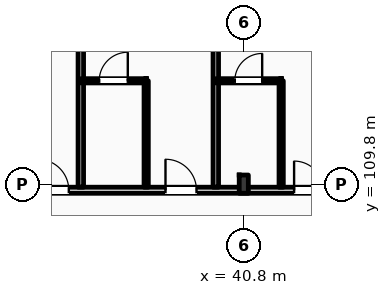
"""IFC4 building model, lengths in metres.
Left out: names, types, materials, properties, quantities, classifications, styles, units other than length and angle.
Written with IfcOpenShell. Run it as: python <this file> out.ifc"""

import sys

from ifc_helpers import new_model, si_unit, direction, frame, frame_2d, origin, origin_2d, place, context, subcontext, project, spatial, rectangle, i_section, extrude, element, fill, save


model = new_model("IFC4")
c1 = context("Model", 3, precision=1e-05, world=origin(), true_north=direction((0.0, 1.0)))
c2 = subcontext(c1, "Body", "Model", "MODEL_VIEW")
j1 = project(units=[si_unit("LENGTHUNIT", "METRE"), si_unit("PLANEANGLEUNIT", "RADIAN")], contexts=[c1])
p1 = place(None, origin())
s1 = spatial("IfcSite", under=j1, at=p1, CompositionType="ELEMENT")
p2 = place(p1, origin())
s2 = spatial("IfcBuilding", under=s1, at=p2, CompositionType="ELEMENT")
p3 = place(p2, frame((0.0, 0.0, 20.4)))
s3 = spatial("IfcBuildingStorey", under=s2, at=p3, CompositionType="ELEMENT", Elevation=20.4)
p4 = place(p3, frame((40.8, 109.8, 0.0), z_axis=(0.0, 0.0, 1.0), x_axis=(1.0, 0.0, 0.0)))
e1 = element("IfcColumn", 1, at=p4, inside=s3, PredefinedType="COLUMN", context=c2, shape_type="SweptSolid", body=[
    extrude(i_section(OverallWidth=0.3, OverallDepth=0.6, WebThickness=0.015, FlangeThickness=0.03, FilletRadius=0.027, at=origin_2d()), origin(), (0.0, 0.0, 1.0), 4.2),
])
p5 = place(p3, frame((10.65, 109.6, 0.0), z_axis=(0.0, 0.0, 1.0), x_axis=(1.0, 0.0, 0.0)))
e2 = element("IfcWall", 2, at=p5, inside=s3, PredefinedType="PARTITIONING", context=c2, shape_type="SweptSolid", body=[
    extrude(rectangle(XDim=109.21, YDim=0.2, at=frame_2d((54.605, 0.0))), origin(), (0.0, 0.0, 1.0), 3.38),
])
p6 = place(p5, frame((12.535, 0.0, 0.0)))
e3 = element("IfcOpeningElement", 3, at=p6, cuts=e2, PredefinedType="OPENING", context=c2, shape_type="SweptSolid", body=[
    extrude(rectangle(XDim=1.02, YDim=2.2, at=frame_2d((0.51, 1.1))), frame((0.0, 0.11, 0.0), z_axis=(0.0, -1.0, 0.0), x_axis=(1.0, 0.0, 0.0)), (0.0, 0.0, 1.0), 0.22),
])
p7 = place(p5, frame((19.175, 0.0, 0.0)))
e4 = element("IfcOpeningElement", 4, at=p7, cuts=e2, PredefinedType="OPENING", context=c2, shape_type="SweptSolid", body=[
    extrude(rectangle(XDim=1.02, YDim=2.2, at=frame_2d((0.51, 1.1))), frame((0.0, 0.11, 0.0), z_axis=(0.0, -1.0, 0.0), x_axis=(1.0, 0.0, 0.0)), (0.0, 0.0, 1.0), 0.22),
])
p8 = place(p5, frame((23.375, 0.0, 0.0)))
e5 = element("IfcOpeningElement", 5, at=p8, cuts=e2, PredefinedType="OPENING", context=c2, shape_type="SweptSolid", body=[
    extrude(rectangle(XDim=1.02, YDim=2.2, at=frame_2d((0.51, 1.1))), frame((0.0, 0.11, 0.0), z_axis=(0.0, -1.0, 0.0), x_axis=(1.0, 0.0, 0.0)), (0.0, 0.0, 1.0), 0.22),
])
p9 = place(p5, frame((27.575, 0.0, 0.0)))
e6 = element("IfcOpeningElement", 6, at=p9, cuts=e2, PredefinedType="OPENING", context=c2, shape_type="SweptSolid", body=[
    extrude(rectangle(XDim=1.02, YDim=2.2, at=frame_2d((0.51, 1.1))), frame((0.0, 0.11, 0.0), z_axis=(0.0, -1.0, 0.0), x_axis=(1.0, 0.0, 0.0)), (0.0, 0.0, 1.0), 0.22),
])
p10 = place(p5, frame((31.805, 0.0, 0.0)))
e7 = element("IfcOpeningElement", 7, at=p10, cuts=e2, PredefinedType="OPENING", context=c2, shape_type="SweptSolid", body=[
    extrude(rectangle(XDim=0.96, YDim=2.2, at=frame_2d((0.48, 1.1))), frame((0.0, 0.11, 0.0), z_axis=(0.0, -1.0, 0.0), x_axis=(1.0, 0.0, 0.0)), (0.0, 0.0, 1.0), 0.22),
])
p11 = place(p5, frame((33.855, 0.0, 0.0)))
e8 = element("IfcOpeningElement", 8, at=p11, cuts=e2, PredefinedType="OPENING", context=c2, shape_type="SweptSolid", body=[
    extrude(rectangle(XDim=0.96, YDim=2.2, at=frame_2d((0.48, 1.1))), frame((0.0, 0.11, 0.0), z_axis=(0.0, -1.0, 0.0), x_axis=(1.0, 0.0, 0.0)), (0.0, 0.0, 1.0), 0.22),
])
p12 = place(p5, frame((40.205, 0.0, 0.0)))
e9 = element("IfcOpeningElement", 9, at=p12, cuts=e2, PredefinedType="OPENING", context=c2, shape_type="SweptSolid", body=[
    extrude(rectangle(XDim=0.96, YDim=2.2, at=frame_2d((0.48, 1.1))), frame((0.0, 0.11, 0.0), z_axis=(0.0, -1.0, 0.0), x_axis=(1.0, 0.0, 0.0)), (0.0, 0.0, 1.0), 0.22),
])
p13 = place(p5, frame((42.255, 0.0, 0.0)))
e10 = element("IfcOpeningElement", 10, at=p13, cuts=e2, PredefinedType="OPENING", context=c2, shape_type="SweptSolid", body=[
    extrude(rectangle(XDim=0.96, YDim=2.2, at=frame_2d((0.48, 1.1))), frame((0.0, 0.11, 0.0), z_axis=(0.0, -1.0, 0.0), x_axis=(1.0, 0.0, 0.0)), (0.0, 0.0, 1.0), 0.22),
])
p14 = place(p5, frame((48.605, 0.0, 0.0)))
e11 = element("IfcOpeningElement", 11, at=p14, cuts=e2, PredefinedType="OPENING", context=c2, shape_type="SweptSolid", body=[
    extrude(rectangle(XDim=0.96, YDim=2.2, at=frame_2d((0.48, 1.1))), frame((0.0, 0.11, 0.0), z_axis=(0.0, -1.0, 0.0), x_axis=(1.0, 0.0, 0.0)), (0.0, 0.0, 1.0), 0.22),
])
p15 = place(p5, frame((50.655, 0.0, 0.0)))
e12 = element("IfcOpeningElement", 12, at=p15, cuts=e2, PredefinedType="OPENING", context=c2, shape_type="SweptSolid", body=[
    extrude(rectangle(XDim=0.96, YDim=2.2, at=frame_2d((0.48, 1.1))), frame((0.0, 0.11, 0.0), z_axis=(0.0, -1.0, 0.0), x_axis=(1.0, 0.0, 0.0)), (0.0, 0.0, 1.0), 0.22),
])
p16 = place(p5, frame((57.005, 0.0, 0.0)))
e13 = element("IfcOpeningElement", 13, at=p16, cuts=e2, PredefinedType="OPENING", context=c2, shape_type="SweptSolid", body=[
    extrude(rectangle(XDim=0.96, YDim=2.2, at=frame_2d((0.48, 1.1))), frame((0.0, 0.11, 0.0), z_axis=(0.0, -1.0, 0.0), x_axis=(1.0, 0.0, 0.0)), (0.0, 0.0, 1.0), 0.22),
])
p17 = place(p5, frame((59.055, 0.0, 0.0)))
e14 = element("IfcOpeningElement", 14, at=p17, cuts=e2, PredefinedType="OPENING", context=c2, shape_type="SweptSolid", body=[
    extrude(rectangle(XDim=0.96, YDim=2.2, at=frame_2d((0.48, 1.1))), frame((0.0, 0.11, 0.0), z_axis=(0.0, -1.0, 0.0), x_axis=(1.0, 0.0, 0.0)), (0.0, 0.0, 1.0), 0.22),
])
p18 = place(p5, frame((65.405, 0.0, 0.0)))
e15 = element("IfcOpeningElement", 15, at=p18, cuts=e2, PredefinedType="OPENING", context=c2, shape_type="SweptSolid", body=[
    extrude(rectangle(XDim=0.96, YDim=2.2, at=frame_2d((0.48, 1.1))), frame((0.0, 0.11, 0.0), z_axis=(0.0, -1.0, 0.0), x_axis=(1.0, 0.0, 0.0)), (0.0, 0.0, 1.0), 0.22),
])
p19 = place(p5, frame((67.205, 0.0, 0.0)))
e16 = element("IfcOpeningElement", 16, at=p19, cuts=e2, PredefinedType="OPENING", context=c2, shape_type="SweptSolid", body=[
    extrude(rectangle(XDim=0.96, YDim=2.2, at=frame_2d((0.48, 1.1))), frame((0.0, 0.11, 0.0), z_axis=(0.0, -1.0, 0.0), x_axis=(1.0, 0.0, 0.0)), (0.0, 0.0, 1.0), 0.22),
])
p20 = place(p5, frame((73.805, 0.0, 0.0)))
e17 = element("IfcOpeningElement", 17, at=p20, cuts=e2, PredefinedType="OPENING", context=c2, shape_type="SweptSolid", body=[
    extrude(rectangle(XDim=0.96, YDim=2.2, at=frame_2d((0.48, 1.1))), frame((0.0, 0.11, 0.0), z_axis=(0.0, -1.0, 0.0), x_axis=(1.0, 0.0, 0.0)), (0.0, 0.0, 1.0), 0.22),
])
p21 = place(p5, frame((78.255, 0.0, 0.0)))
e18 = element("IfcOpeningElement", 18, at=p21, cuts=e2, PredefinedType="OPENING", context=c2, shape_type="SweptSolid", body=[
    extrude(rectangle(XDim=0.96, YDim=2.2, at=frame_2d((0.48, 1.1))), frame((0.0, 0.11, 0.0), z_axis=(0.0, -1.0, 0.0), x_axis=(1.0, 0.0, 0.0)), (0.0, 0.0, 1.0), 0.22),
])
p22 = place(p5, frame((82.205, 0.0, 0.0)))
e19 = element("IfcOpeningElement", 19, at=p22, cuts=e2, PredefinedType="OPENING", context=c2, shape_type="SweptSolid", body=[
    extrude(rectangle(XDim=0.96, YDim=2.2, at=frame_2d((0.48, 1.1))), frame((0.0, 0.11, 0.0), z_axis=(0.0, -1.0, 0.0), x_axis=(1.0, 0.0, 0.0)), (0.0, 0.0, 1.0), 0.22),
])
p23 = place(p5, frame((86.405, 0.0, 0.0)))
e20 = element("IfcOpeningElement", 20, at=p23, cuts=e2, PredefinedType="OPENING", context=c2, shape_type="SweptSolid", body=[
    extrude(rectangle(XDim=0.96, YDim=2.2, at=frame_2d((0.48, 1.1))), frame((0.0, 0.11, 0.0), z_axis=(0.0, -1.0, 0.0), x_axis=(1.0, 0.0, 0.0)), (0.0, 0.0, 1.0), 0.22),
])
p24 = place(p5, frame((90.605, 0.0, 0.0)))
e21 = element("IfcOpeningElement", 21, at=p24, cuts=e2, PredefinedType="OPENING", context=c2, shape_type="SweptSolid", body=[
    extrude(rectangle(XDim=0.96, YDim=2.2, at=frame_2d((0.48, 1.1))), frame((0.0, 0.11, 0.0), z_axis=(0.0, -1.0, 0.0), x_axis=(1.0, 0.0, 0.0)), (0.0, 0.0, 1.0), 0.22),
])
p25 = place(p5, frame((94.805, 0.0, 0.0)))
e22 = element("IfcOpeningElement", 22, at=p25, cuts=e2, PredefinedType="OPENING", context=c2, shape_type="SweptSolid", body=[
    extrude(rectangle(XDim=0.96, YDim=2.2, at=frame_2d((0.48, 1.1))), frame((0.0, 0.11, 0.0), z_axis=(0.0, -1.0, 0.0), x_axis=(1.0, 0.0, 0.0)), (0.0, 0.0, 1.0), 0.22),
])
p26 = place(p5, frame((99.005, 0.0, 0.0)))
e23 = element("IfcOpeningElement", 23, at=p26, cuts=e2, PredefinedType="OPENING", context=c2, shape_type="SweptSolid", body=[
    extrude(rectangle(XDim=0.96, YDim=2.2, at=frame_2d((0.48, 1.1))), frame((0.0, 0.11, 0.0), z_axis=(0.0, -1.0, 0.0), x_axis=(1.0, 0.0, 0.0)), (0.0, 0.0, 1.0), 0.22),
])
p27 = place(p5, frame((103.205, 0.0, 0.0)))
e24 = element("IfcOpeningElement", 24, at=p27, cuts=e2, PredefinedType="OPENING", context=c2, shape_type="SweptSolid", body=[
    extrude(rectangle(XDim=0.96, YDim=2.2, at=frame_2d((0.48, 1.1))), frame((0.0, 0.11, 0.0), z_axis=(0.0, -1.0, 0.0), x_axis=(1.0, 0.0, 0.0)), (0.0, 0.0, 1.0), 0.22),
])
p28 = place(p5, frame((105.335, 0.0, 0.0)))
e25 = element("IfcOpeningElement", 25, at=p28, cuts=e2, PredefinedType="OPENING", context=c2, shape_type="SweptSolid", body=[
    extrude(rectangle(XDim=0.96, YDim=2.2, at=frame_2d((0.48, 1.1))), frame((0.0, 0.11, 0.0), z_axis=(0.0, -1.0, 0.0), x_axis=(1.0, 0.0, 0.0)), (0.0, 0.0, 1.0), 0.22),
])
p29 = place(p5, frame((2.716, 0.0, 0.0)))
e26 = element("IfcOpeningElement", 26, at=p29, cuts=e2, PredefinedType="OPENING", context=c2, shape_type="SweptSolid", body=[
    extrude(rectangle(XDim=1.35, YDim=2.25, at=frame_2d((0.675, 1.125))), frame((0.0, 0.11, 0.0), z_axis=(0.0, -1.0, 0.0), x_axis=(1.0, 0.0, 0.0)), (0.0, 0.0, 1.0), 0.22),
])
p30 = place(p5, frame((6.65, 0.0, 0.0)))
e27 = element("IfcOpeningElement", 27, at=p30, cuts=e2, PredefinedType="OPENING", context=c2, shape_type="SweptSolid", body=[
    extrude(rectangle(XDim=1.35, YDim=2.25, at=frame_2d((0.675, 1.125))), frame((0.0, 0.11, 0.0), z_axis=(0.0, -1.0, 0.0), x_axis=(1.0, 0.0, 0.0)), (0.0, 0.0, 1.0), 0.22),
])
p31 = place(p5, frame((10.583, 0.0, 0.0)))
e28 = element("IfcOpeningElement", 28, at=p31, cuts=e2, PredefinedType="OPENING", context=c2, shape_type="SweptSolid", body=[
    extrude(rectangle(XDim=1.35, YDim=2.25, at=frame_2d((0.675, 1.125))), frame((0.0, 0.11, 0.0), z_axis=(0.0, -1.0, 0.0), x_axis=(1.0, 0.0, 0.0)), (0.0, 0.0, 1.0), 0.22),
])
p32 = place(p3, frame((35.44, 109.7, 0.0), z_axis=(0.0, 0.0, 1.0), x_axis=(0.0, 1.0, 0.0)))
e29 = element("IfcWall", 29, at=p32, inside=s3, PredefinedType="PARTITIONING", context=c2, shape_type="SweptSolid", body=[
    extrude(rectangle(XDim=8.15, YDim=0.18, at=frame_2d((4.075, 0.0))), origin(), (0.0, 0.0, 1.0), 3.63),
])
p33 = place(p3, frame((39.88, 109.7, 0.0), z_axis=(0.0, 0.0, 1.0), x_axis=(0.0, 1.0, 0.0)))
e30 = element("IfcWall", 30, at=p33, inside=s3, PredefinedType="PARTITIONING", context=c2, shape_type="SweptSolid", body=[
    extrude(rectangle(XDim=8.15, YDim=0.18, at=frame_2d((4.075, 0.0))), origin(), (0.0, 0.0, 1.0), 3.94),
])
p34 = place(p3, frame((37.59, 109.7, 0.0), z_axis=(0.0, 0.0, 1.0), x_axis=(0.0, 1.0, 0.0)))
e31 = element("IfcWall", 31, at=p34, inside=s3, PredefinedType="PARTITIONING", context=c2, shape_type="SweptSolid", body=[
    extrude(rectangle(XDim=3.5, YDim=0.14, at=frame_2d((1.75, 0.0))), origin(), (0.0, 0.0, 1.0), 3.94),
])
p35 = place(p3, frame((35.44, 113.2, 0.0), z_axis=(0.0, 0.0, 1.0), x_axis=(1.0, 0.0, 0.0)))
e32 = element("IfcWall", 32, at=p35, inside=s3, PredefinedType="PARTITIONING", context=c2, shape_type="SweptSolid", body=[
    extrude(rectangle(XDim=2.15, YDim=0.14, at=frame_2d((1.075, 0.0))), origin(), (0.0, 0.0, 1.0), 3.94),
])
p36 = place(p35, frame((0.605, 0.0, 0.0)))
e33 = element("IfcOpeningElement", 33, at=p36, cuts=e32, PredefinedType="OPENING", context=c2, shape_type="SweptSolid", body=[
    extrude(rectangle(XDim=0.94, YDim=2.15, at=frame_2d((0.47, 1.075))), frame((0.0, 0.08, 0.0), z_axis=(0.0, -1.0, 0.0), x_axis=(1.0, 0.0, 0.0)), (0.0, 0.0, 1.0), 0.16),
])
p37 = place(p3, frame((42.03, 109.7, 0.0), z_axis=(0.0, 0.0, 1.0), x_axis=(0.0, 1.0, 0.0)))
e34 = element("IfcWall", 34, at=p37, inside=s3, PredefinedType="PARTITIONING", context=c2, shape_type="SweptSolid", body=[
    extrude(rectangle(XDim=3.5, YDim=0.14, at=frame_2d((1.75, 0.0))), origin(), (0.0, 0.0, 1.0), 3.94),
])
p38 = place(p3, frame((39.88, 113.2, 0.0), z_axis=(0.0, 0.0, 1.0), x_axis=(1.0, 0.0, 0.0)))
e35 = element("IfcWall", 35, at=p38, inside=s3, PredefinedType="PARTITIONING", context=c2, shape_type="SweptSolid", body=[
    extrude(rectangle(XDim=2.15, YDim=0.14, at=frame_2d((1.075, 0.0))), origin(), (0.0, 0.0, 1.0), 3.94),
])
p39 = place(p38, frame((0.625, 0.0, 0.0)))
e36 = element("IfcOpeningElement", 36, at=p39, cuts=e35, PredefinedType="OPENING", context=c2, shape_type="SweptSolid", body=[
    extrude(rectangle(XDim=0.9, YDim=2.1, at=frame_2d((0.45, 1.05))), frame((0.0, 0.08, 0.0), z_axis=(0.0, -1.0, 0.0), x_axis=(1.0, 0.0, 0.0)), (0.0, 0.0, 1.0), 0.16),
])
p40 = place(p8, origin())
e37 = element("IfcDoor", 37, at=p40, inside=s3, OperationType="SINGLE_SWING_LEFT", PredefinedType="DOOR", context=c2, shape_type="SweptSolid", body=[
    extrude(rectangle(XDim=1.02, YDim=2.2, at=frame_2d((0.51, 1.1))), frame((0.0, 0.025, 0.0), z_axis=(0.0, -1.0, 0.0), x_axis=(1.0, 0.0, 0.0)), (0.0, 0.0, 1.0), 0.05),
])
fill(e5, e37)
p41 = place(p9, origin())
e38 = element("IfcDoor", 38, at=p41, inside=s3, OperationType="SINGLE_SWING_LEFT", PredefinedType="DOOR", context=c2, shape_type="SweptSolid", body=[
    extrude(rectangle(XDim=1.02, YDim=2.2, at=frame_2d((0.51, 1.1))), frame((0.0, 0.025, 0.0), z_axis=(0.0, -1.0, 0.0), x_axis=(1.0, 0.0, 0.0)), (0.0, 0.0, 1.0), 0.05),
])
fill(e6, e38)
p42 = place(p36, origin())
e39 = element("IfcDoor", 39, at=p42, inside=s3, OperationType="SINGLE_SWING_RIGHT", PredefinedType="DOOR", context=c2, shape_type="SweptSolid", body=[
    extrude(rectangle(XDim=0.94, YDim=2.15, at=frame_2d((0.47, 1.075))), frame((0.0, 0.025, 0.0), z_axis=(0.0, -1.0, 0.0), x_axis=(1.0, 0.0, 0.0)), (0.0, 0.0, 1.0), 0.05),
])
fill(e33, e39)
p43 = place(p10, origin())
e40 = element("IfcDoor", 40, at=p43, inside=s3, OperationType="SINGLE_SWING_LEFT", PredefinedType="DOOR", context=c2, shape_type="SweptSolid", body=[
    extrude(rectangle(XDim=0.96, YDim=2.2, at=frame_2d((0.48, 1.1))), frame((0.0, 0.025, 0.0), z_axis=(0.0, -1.0, 0.0), x_axis=(1.0, 0.0, 0.0)), (0.0, 0.0, 1.0), 0.05),
])
fill(e7, e40)
p44 = place(p39, origin())
e41 = element("IfcDoor", 41, at=p44, inside=s3, OperationType="SINGLE_SWING_RIGHT", PredefinedType="DOOR", context=c2, shape_type="SweptSolid", body=[
    extrude(rectangle(XDim=0.9, YDim=2.1, at=frame_2d((0.45, 1.05))), frame((0.0, 0.025, 0.0), z_axis=(0.0, -1.0, 0.0), x_axis=(1.0, 0.0, 0.0)), (0.0, 0.0, 1.0), 0.05),
])
fill(e36, e41)
save(model, sys.argv[1])
